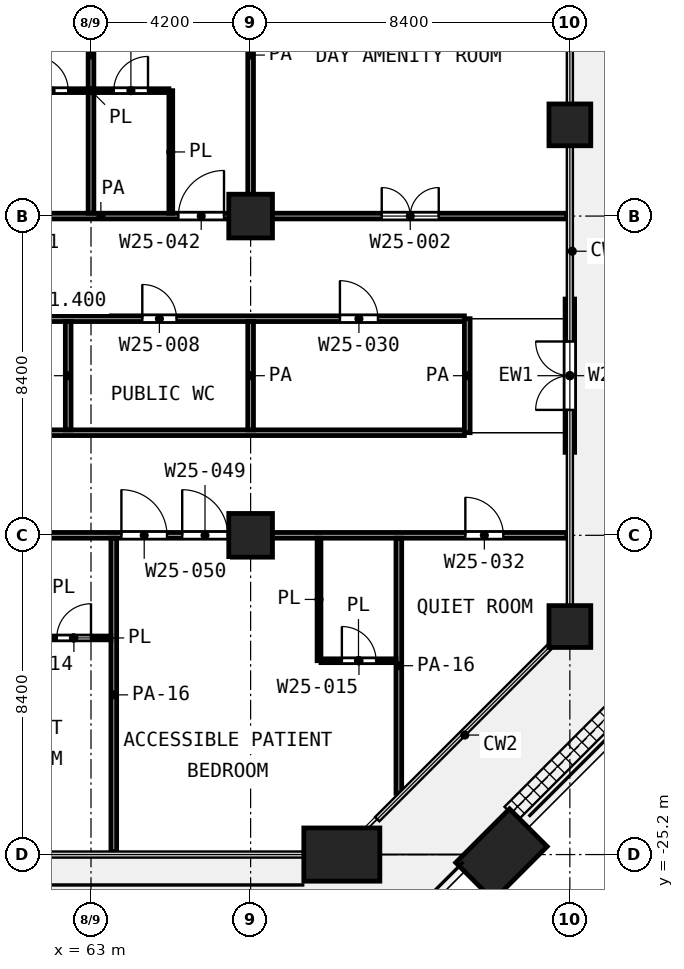
"""IFC4 building model, lengths in metres.
Left out: names, types, materials, properties, quantities, classifications, styles, units other than length and angle.
Written with IfcOpenShell. Run it as: python <this file> out.ifc"""

import sys

from ifc_helpers import new_model, si_unit, direction, frame, frame_2d, origin, origin_2d, place, context, subcontext, project, spatial, rectangle, extrude, element, fill, save


model = new_model("IFC4")
c1 = context("Model", 3, precision=1e-05, world=origin(), true_north=direction((0.0, 1.0)))
c2 = subcontext(c1, "Body", "Model", "MODEL_VIEW")
j1 = project(units=[si_unit("LENGTHUNIT", "METRE"), si_unit("PLANEANGLEUNIT", "RADIAN")], contexts=[c1])
p1 = place(None, origin())
s1 = spatial("IfcSite", under=j1, at=p1, CompositionType="ELEMENT")
p2 = place(p1, origin())
s2 = spatial("IfcBuilding", under=s1, at=p2, CompositionType="ELEMENT")
p3 = place(p2, frame((0.0, 0.0, 111.4)))
s3 = spatial("IfcBuildingStorey", under=s2, at=p3, CompositionType="ELEMENT", Elevation=111.4)
p4 = place(p3, frame((75.6, -6.0, 0.0), z_axis=(0.0, 0.0, 1.0), x_axis=(1.0, 0.0, 0.0)))
e1 = element("IfcColumn", 1, at=p4, inside=s3, PredefinedType="COLUMN", context=c2, shape_type="SweptSolid", body=[
    extrude(rectangle(XDim=1.1, YDim=1.1, at=origin_2d()), origin(), (0.0, 0.0, 1.0), 4.2),
])
for number, where, z_axis, x_axis in (
    (2, (67.2, -8.4, 0.0), (0.0, 0.0, 1.0), (1.0, 0.0, 0.0)),
    (3, (67.2, -16.8, 0.0), (0.0, 0.0, 1.0), (1.0, 0.0, 0.0)),
):
    element("IfcColumn", number, at=place(p3, frame(where, z_axis=z_axis, x_axis=x_axis)), inside=s3, PredefinedType="COLUMN", context=c2, shape_type="SweptSolid", body=[
        extrude(rectangle(XDim=1.15, YDim=1.15, at=origin_2d()), origin(), (0.0, 0.0, 1.0), 4.2),
    ])
p5 = place(p3, frame((75.6, -19.2, 0.0), z_axis=(0.0, 0.0, 1.0), x_axis=(1.0, 0.0, 0.0)))
e4 = element("IfcColumn", 4, at=p5, inside=s3, PredefinedType="COLUMN", context=c2, shape_type="SweptSolid", body=[
    extrude(rectangle(XDim=1.1, YDim=1.1, at=origin_2d()), origin(), (0.0, 0.0, 1.0), 4.2),
])
for number, where, z_axis, x_axis in (
    (5, (69.6, -25.2, 0.0), (0.0, 0.0, 1.0), (-1.0, 0.0, 0.0)),
    (6, (73.8, -25.2, 0.0), (0.0, 0.0, 1.0), (-0.707, -0.707, 0.0)),
):
    element("IfcColumn", number, at=place(p3, frame(where, z_axis=z_axis, x_axis=x_axis)), inside=s3, PredefinedType="COLUMN", context=c2, shape_type="SweptSolid", body=[
        extrude(rectangle(XDim=2.0, YDim=1.4, at=origin_2d()), origin(), (0.0, 0.0, 1.0), 4.2),
    ])
p6 = place(p3, frame((75.6, -14.617, 0.0), z_axis=(0.0, 0.0, 1.0), x_axis=(0.0, 1.0, 0.0)))
e7 = element("IfcWall", 7, at=p6, inside=s3, PredefinedType="SOLIDWALL", context=c2, shape_type="SweptSolid", body=[
    extrude(rectangle(XDim=4.033, YDim=0.25, at=frame_2d((2.017, 0.0))), origin(), (0.0, 0.0, 1.0), 3.48),
])
p7 = place(p6, frame((1.117, 0.0, 0.0)))
e8 = element("IfcOpeningElement", 8, at=p7, cuts=e7, PredefinedType="OPENING", context=c2, shape_type="SweptSolid", body=[
    extrude(rectangle(XDim=1.8, YDim=2.1, at=frame_2d((0.9, 1.05))), frame((0.0, 0.135, 0.0), z_axis=(0.0, -1.0, 0.0), x_axis=(1.0, 0.0, 0.0)), (0.0, 0.0, 1.0), 0.27),
])
p8 = place(p3, frame((69.052, -20.1, 0.0), z_axis=(0.0, 0.0, 1.0), x_axis=(1.0, 0.0, 0.0)))
e9 = element("IfcWall", 9, at=p8, inside=s3, PredefinedType="PARTITIONING", context=c2, shape_type="SweptSolid", body=[
    extrude(rectangle(XDim=1.973, YDim=0.1, at=frame_2d((0.986, 0.0))), origin(), (0.0, 0.0, 1.0), 3.6),
])
p9 = place(p8, frame((0.549, 0.0, 0.0)))
e10 = element("IfcOpeningElement", 10, at=p9, cuts=e9, PredefinedType="OPENING", context=c2, shape_type="SweptSolid", body=[
    extrude(rectangle(XDim=0.9, YDim=2.1, at=frame_2d((0.45, 1.05))), frame((0.0, 0.06, 0.0), z_axis=(0.0, -1.0, 0.0), x_axis=(1.0, 0.0, 0.0)), (0.0, 0.0, 1.0), 0.12),
])
p10 = place(p3, frame((61.55, -19.5, 0.0), z_axis=(0.0, 0.0, 1.0), x_axis=(1.0, 0.0, 0.0)))
e11 = element("IfcWall", 11, at=p10, inside=s3, PredefinedType="PARTITIONING", context=c2, shape_type="SweptSolid", body=[
    extrude(rectangle(XDim=1.975, YDim=0.1, at=frame_2d((0.987, 0.0))), origin(), (0.0, 0.0, 1.0), 3.6),
])
p11 = place(p10, frame((0.55, 0.0, 0.0)))
e12 = element("IfcOpeningElement", 12, at=p11, cuts=e11, PredefinedType="OPENING", context=c2, shape_type="SweptSolid", body=[
    extrude(rectangle(XDim=0.9, YDim=2.1, at=frame_2d((0.45, 1.05))), frame((0.0, 0.06, 0.0), z_axis=(0.0, -1.0, 0.0), x_axis=(1.0, 0.0, 0.0)), (0.0, 0.0, 1.0), 0.12),
])
p12 = place(p3, frame((60.95, -5.1, 0.0), z_axis=(0.0, 0.0, 1.0), x_axis=(1.0, 0.0, 0.0)))
e13 = element("IfcWall", 13, at=p12, inside=s3, PredefinedType="PARTITIONING", context=c2, shape_type="SweptSolid", body=[
    extrude(rectangle(XDim=4.1, YDim=0.1, at=frame_2d((2.05, 0.0))), origin(), (0.0, 0.0, 1.0), 3.6),
])
p13 = place(p12, frame((0.55, 0.0, 0.0)))
e14 = element("IfcOpeningElement", 14, at=p13, cuts=e13, PredefinedType="OPENING", context=c2, shape_type="SweptSolid", body=[
    extrude(rectangle(XDim=0.9, YDim=2.1, at=frame_2d((0.45, 1.05))), frame((0.0, 0.06, 0.0), z_axis=(0.0, -1.0, 0.0), x_axis=(1.0, 0.0, 0.0)), (0.0, 0.0, 1.0), 0.12),
])
p14 = place(p12, frame((2.65, 0.0, 0.0)))
e15 = element("IfcOpeningElement", 15, at=p14, cuts=e13, PredefinedType="OPENING", context=c2, shape_type="SweptSolid", body=[
    extrude(rectangle(XDim=0.9, YDim=2.1, at=frame_2d((0.45, 1.05))), frame((0.0, 0.06, 0.0), z_axis=(0.0, -1.0, 0.0), x_axis=(1.0, 0.0, 0.0)), (0.0, 0.0, 1.0), 0.12),
])
p15 = place(p3, frame((65.1, -8.325, 0.0), z_axis=(0.0, 0.0, 1.0), x_axis=(0.0, 1.0, 0.0)))
e16 = element("IfcWall", 16, at=p15, inside=s3, PredefinedType="PARTITIONING", context=c2, shape_type="SweptSolid", body=[
    extrude(rectangle(XDim=3.225, YDim=0.1, at=frame_2d((1.612, 0.0))), origin(), (0.0, 0.0, 1.0), 3.6),
])
p16 = place(p3, frame((69.0, -20.099, 0.0), z_axis=(0.0, 0.0, 1.0), x_axis=(0.0, 1.0, 0.0)))
e17 = element("IfcWall", 17, at=p16, inside=s3, PredefinedType="PARTITIONING", context=c2, shape_type="SweptSolid", body=[
    extrude(rectangle(XDim=3.224, YDim=0.1, at=frame_2d((1.612, 0.0))), origin(), (0.0, 0.0, 1.0), 3.6),
])
p17 = place(p3, frame((25.0, -16.8, 0.0), z_axis=(0.0, 0.0, 1.0), x_axis=(1.0, 0.0, 0.0)))
e18 = element("IfcWall", 18, at=p17, inside=s3, PredefinedType="PARTITIONING", context=c2, shape_type="SweptSolid", body=[
    extrude(rectangle(XDim=50.52, YDim=0.15, at=frame_2d((25.26, 0.0))), origin(), (0.0, 0.0, 1.0), 3.6),
])
p18 = place(p17, frame((1.55, 0.0, 0.0)))
e19 = element("IfcOpeningElement", 19, at=p18, cuts=e18, PredefinedType="OPENING", context=c2, shape_type="SweptSolid", body=[
    extrude(rectangle(XDim=1.5, YDim=2.1, at=frame_2d((0.75, 1.05))), frame((0.0, 0.085, 0.0), z_axis=(0.0, -1.0, 0.0), x_axis=(1.0, 0.0, 0.0)), (0.0, 0.0, 1.0), 0.17),
])
p19 = place(p17, frame((6.0, 0.0, 0.0)))
e20 = element("IfcOpeningElement", 20, at=p19, cuts=e18, PredefinedType="OPENING", context=c2, shape_type="SweptSolid", body=[
    extrude(rectangle(XDim=1.0, YDim=2.1, at=frame_2d((0.5, 1.05))), frame((0.0, 0.085, 0.0), z_axis=(0.0, -1.0, 0.0), x_axis=(1.0, 0.0, 0.0)), (0.0, 0.0, 1.0), 0.17),
])
p20 = place(p17, frame((9.6, 0.0, 0.0)))
e21 = element("IfcOpeningElement", 21, at=p20, cuts=e18, PredefinedType="OPENING", context=c2, shape_type="SweptSolid", body=[
    extrude(rectangle(XDim=1.2, YDim=2.1, at=frame_2d((0.6, 1.05))), frame((0.0, 0.085, 0.0), z_axis=(0.0, -1.0, 0.0), x_axis=(1.0, 0.0, 0.0)), (0.0, 0.0, 1.0), 0.17),
])
p21 = place(p17, frame((18.2, 0.0, 0.0)))
e22 = element("IfcOpeningElement", 22, at=p21, cuts=e18, PredefinedType="OPENING", context=c2, shape_type="SweptSolid", body=[
    extrude(rectangle(XDim=1.2, YDim=2.1, at=frame_2d((0.6, 1.05))), frame((0.0, 0.085, 0.0), z_axis=(0.0, -1.0, 0.0), x_axis=(1.0, 0.0, 0.0)), (0.0, 0.0, 1.0), 0.17),
])
p22 = place(p17, frame((15.45, 0.0, 0.0)))
e23 = element("IfcOpeningElement", 23, at=p22, cuts=e18, PredefinedType="OPENING", context=c2, shape_type="SweptSolid", body=[
    extrude(rectangle(XDim=0.9, YDim=2.1, at=frame_2d((0.45, 1.05))), frame((0.0, 0.085, 0.0), z_axis=(0.0, -1.0, 0.0), x_axis=(1.0, 0.0, 0.0)), (0.0, 0.0, 1.0), 0.17),
])
p23 = place(p17, frame((23.6, 0.0, 0.0)))
e24 = element("IfcOpeningElement", 24, at=p23, cuts=e18, PredefinedType="OPENING", context=c2, shape_type="SweptSolid", body=[
    extrude(rectangle(XDim=1.2, YDim=2.1, at=frame_2d((0.6, 1.05))), frame((0.0, 0.085, 0.0), z_axis=(0.0, -1.0, 0.0), x_axis=(1.0, 0.0, 0.0)), (0.0, 0.0, 1.0), 0.17),
])
p24 = place(p17, frame((26.1, 0.0, 0.0)))
e25 = element("IfcOpeningElement", 25, at=p24, cuts=e18, PredefinedType="OPENING", context=c2, shape_type="SweptSolid", body=[
    extrude(rectangle(XDim=1.2, YDim=2.1, at=frame_2d((0.6, 1.05))), frame((0.0, 0.085, 0.0), z_axis=(0.0, -1.0, 0.0), x_axis=(1.0, 0.0, 0.0)), (0.0, 0.0, 1.0), 0.17),
])
p25 = place(p17, frame((32.0, 0.0, 0.0)))
e26 = element("IfcOpeningElement", 26, at=p25, cuts=e18, PredefinedType="OPENING", context=c2, shape_type="SweptSolid", body=[
    extrude(rectangle(XDim=1.2, YDim=2.1, at=frame_2d((0.6, 1.05))), frame((0.0, 0.085, 0.0), z_axis=(0.0, -1.0, 0.0), x_axis=(1.0, 0.0, 0.0)), (0.0, 0.0, 1.0), 0.17),
])
p26 = place(p17, frame((35.0, 0.0, 0.0)))
e27 = element("IfcOpeningElement", 27, at=p26, cuts=e18, PredefinedType="OPENING", context=c2, shape_type="SweptSolid", body=[
    extrude(rectangle(XDim=1.2, YDim=2.1, at=frame_2d((0.6, 1.05))), frame((0.0, 0.085, 0.0), z_axis=(0.0, -1.0, 0.0), x_axis=(1.0, 0.0, 0.0)), (0.0, 0.0, 1.0), 0.17),
])
p27 = place(p17, frame((40.4, 0.0, 0.0)))
e28 = element("IfcOpeningElement", 28, at=p27, cuts=e18, PredefinedType="OPENING", context=c2, shape_type="SweptSolid", body=[
    extrude(rectangle(XDim=1.2, YDim=2.1, at=frame_2d((0.6, 1.05))), frame((0.0, 0.085, 0.0), z_axis=(0.0, -1.0, 0.0), x_axis=(1.0, 0.0, 0.0)), (0.0, 0.0, 1.0), 0.17),
])
p28 = place(p17, frame((38.8, 0.0, 0.0)))
e29 = element("IfcOpeningElement", 29, at=p28, cuts=e18, PredefinedType="OPENING", context=c2, shape_type="SweptSolid", body=[
    extrude(rectangle(XDim=1.2, YDim=2.1, at=frame_2d((0.6, 1.05))), frame((0.0, 0.085, 0.0), z_axis=(0.0, -1.0, 0.0), x_axis=(1.0, 0.0, 0.0)), (0.0, 0.0, 1.0), 0.17),
])
p29 = place(p17, frame((47.85, 0.0, 0.0)))
e30 = element("IfcOpeningElement", 30, at=p29, cuts=e18, PredefinedType="OPENING", context=c2, shape_type="SweptSolid", body=[
    extrude(rectangle(XDim=1.0, YDim=2.1, at=frame_2d((0.5, 1.05))), frame((0.0, 0.085, 0.0), z_axis=(0.0, -1.0, 0.0), x_axis=(1.0, 0.0, 0.0)), (0.0, 0.0, 1.0), 0.17),
])
p30 = place(p3, frame((29.475, -14.1, 0.0), z_axis=(0.0, 0.0, 1.0), x_axis=(1.0, 0.0, 0.0)))
e31 = element("IfcWall", 31, at=p30, inside=s3, PredefinedType="PARTITIONING", context=c2, shape_type="SweptSolid", body=[
    extrude(rectangle(XDim=43.35, YDim=0.15, at=frame_2d((21.675, 0.0))), origin(), (0.0, 0.0, 1.0), 3.6),
])
p31 = place(p30, frame((20.425, 0.0, 0.0)))
e32 = element("IfcOpeningElement", 32, at=p31, cuts=e31, PredefinedType="OPENING", context=c2, shape_type="SweptSolid", body=[
    extrude(rectangle(XDim=1.0, YDim=2.1, at=frame_2d((0.5, 1.05))), frame((0.0, 0.085, 0.0), z_axis=(0.0, -1.0, 0.0), x_axis=(1.0, 0.0, 0.0)), (0.0, 0.0, 1.0), 0.17),
])
p32 = place(p3, frame((29.475, -11.1, 0.0), z_axis=(0.0, 0.0, 1.0), x_axis=(1.0, 0.0, 0.0)))
e33 = element("IfcWall", 33, at=p32, inside=s3, PredefinedType="PARTITIONING", context=c2, shape_type="SweptSolid", body=[
    extrude(rectangle(XDim=43.35, YDim=0.15, at=frame_2d((21.675, 0.0))), origin(), (0.0, 0.0, 1.0), 3.6),
])
p33 = place(p32, frame((28.675, 0.0, 0.0)))
e34 = element("IfcOpeningElement", 34, at=p33, cuts=e33, PredefinedType="OPENING", context=c2, shape_type="SweptSolid", body=[
    extrude(rectangle(XDim=1.0, YDim=2.1, at=frame_2d((0.5, 1.05))), frame((0.0, 0.085, 0.0), z_axis=(0.0, -1.0, 0.0), x_axis=(1.0, 0.0, 0.0)), (0.0, 0.0, 1.0), 0.17),
])
p34 = place(p32, frame((34.875, 0.0, 0.0)))
e35 = element("IfcOpeningElement", 35, at=p34, cuts=e33, PredefinedType="OPENING", context=c2, shape_type="SweptSolid", body=[
    extrude(rectangle(XDim=0.9, YDim=2.1, at=frame_2d((0.45, 1.05))), frame((0.0, 0.085, 0.0), z_axis=(0.0, -1.0, 0.0), x_axis=(1.0, 0.0, 0.0)), (0.0, 0.0, 1.0), 0.17),
])
p35 = place(p32, frame((40.075, 0.0, 0.0)))
e36 = element("IfcOpeningElement", 36, at=p35, cuts=e33, PredefinedType="OPENING", context=c2, shape_type="SweptSolid", body=[
    extrude(rectangle(XDim=1.0, YDim=2.1, at=frame_2d((0.5, 1.05))), frame((0.0, 0.085, 0.0), z_axis=(0.0, -1.0, 0.0), x_axis=(1.0, 0.0, 0.0)), (0.0, 0.0, 1.0), 0.17),
])
p36 = place(p32, frame((5.475, 0.0, 0.0)))
e37 = element("IfcOpeningElement", 37, at=p36, cuts=e33, PredefinedType="OPENING", context=c2, shape_type="SweptSolid", body=[
    extrude(rectangle(XDim=1.0, YDim=2.1, at=frame_2d((0.5, 1.05))), frame((0.0, 0.085, 0.0), z_axis=(0.0, -1.0, 0.0), x_axis=(1.0, 0.0, 0.0)), (0.0, 0.0, 1.0), 0.17),
])
p37 = place(p32, frame((12.675, 0.0, 0.0)))
e38 = element("IfcOpeningElement", 38, at=p37, cuts=e33, PredefinedType="OPENING", context=c2, shape_type="SweptSolid", body=[
    extrude(rectangle(XDim=1.0, YDim=2.1, at=frame_2d((0.5, 1.05))), frame((0.0, 0.085, 0.0), z_axis=(0.0, -1.0, 0.0), x_axis=(1.0, 0.0, 0.0)), (0.0, 0.0, 1.0), 0.17),
])
p38 = place(p3, frame((51.0, -8.4, 0.0), z_axis=(0.0, 0.0, 1.0), x_axis=(1.0, 0.0, 0.0)))
e39 = element("IfcWall", 39, at=p38, inside=s3, PredefinedType="PARTITIONING", context=c2, shape_type="SweptSolid", body=[
    extrude(rectangle(XDim=24.52, YDim=0.15, at=frame_2d((12.26, 0.0))), origin(), (0.0, 0.0, 1.0), 3.6),
])
p39 = place(p38, frame((5.4, 0.0, 0.0)))
e40 = element("IfcOpeningElement", 40, at=p39, cuts=e39, PredefinedType="OPENING", context=c2, shape_type="SweptSolid", body=[
    extrude(rectangle(XDim=1.2, YDim=2.1, at=frame_2d((0.6, 1.05))), frame((0.0, 0.085, 0.0), z_axis=(0.0, -1.0, 0.0), x_axis=(1.0, 0.0, 0.0)), (0.0, 0.0, 1.0), 0.17),
])
p40 = place(p38, frame((8.4, 0.0, 0.0)))
e41 = element("IfcOpeningElement", 41, at=p40, cuts=e39, PredefinedType="OPENING", context=c2, shape_type="SweptSolid", body=[
    extrude(rectangle(XDim=1.2, YDim=2.1, at=frame_2d((0.6, 1.05))), frame((0.0, 0.085, 0.0), z_axis=(0.0, -1.0, 0.0), x_axis=(1.0, 0.0, 0.0)), (0.0, 0.0, 1.0), 0.17),
])
p41 = place(p38, frame((14.3, 0.0, 0.0)))
e42 = element("IfcOpeningElement", 42, at=p41, cuts=e39, PredefinedType="OPENING", context=c2, shape_type="SweptSolid", body=[
    extrude(rectangle(XDim=1.2, YDim=2.1, at=frame_2d((0.6, 1.05))), frame((0.0, 0.085, 0.0), z_axis=(0.0, -1.0, 0.0), x_axis=(1.0, 0.0, 0.0)), (0.0, 0.0, 1.0), 0.17),
])
p42 = place(p38, frame((19.65, 0.0, 0.0)))
e43 = element("IfcOpeningElement", 43, at=p42, cuts=e39, PredefinedType="OPENING", context=c2, shape_type="SweptSolid", body=[
    extrude(rectangle(XDim=1.5, YDim=2.1, at=frame_2d((0.75, 1.05))), frame((0.0, 0.085, 0.0), z_axis=(0.0, -1.0, 0.0), x_axis=(1.0, 0.0, 0.0)), (0.0, 0.0, 1.0), 0.17),
])
p43 = place(p3, frame((62.4, -14.025, 0.0), z_axis=(0.0, 0.0, 1.0), x_axis=(0.0, 1.0, 0.0)))
e44 = element("IfcWall", 44, at=p43, inside=s3, PredefinedType="PARTITIONING", context=c2, shape_type="SweptSolid", body=[
    extrude(rectangle(XDim=2.85, YDim=0.15, at=frame_2d((1.425, 0.0))), origin(), (0.0, 0.0, 1.0), 3.6),
])
p44 = place(p3, frame((63.0, -8.325, 0.0), z_axis=(0.0, 0.0, 1.0), x_axis=(0.0, 1.0, 0.0)))
e45 = element("IfcWall", 45, at=p44, inside=s3, PredefinedType="PARTITIONING", context=c2, shape_type="SweptSolid", body=[
    extrude(rectangle(XDim=8.325, YDim=0.15, at=frame_2d((4.163, 0.0))), origin(), (0.0, 0.0, 1.0), 3.6),
])
p45 = place(p3, frame((63.6, -25.12, 0.0), z_axis=(0.0, 0.0, 1.0), x_axis=(0.0, 1.0, 0.0)))
e46 = element("IfcWall", 46, at=p45, inside=s3, PredefinedType="PARTITIONING", context=c2, shape_type="SweptSolid", body=[
    extrude(rectangle(XDim=8.245, YDim=0.15, at=frame_2d((4.123, 0.0))), origin(), (0.0, 0.0, 1.0), 2.7),
])
p46 = place(p3, frame((67.2, -14.025, 0.0), z_axis=(0.0, 0.0, 1.0), x_axis=(0.0, 1.0, 0.0)))
e47 = element("IfcWall", 47, at=p46, inside=s3, PredefinedType="PARTITIONING", context=c2, shape_type="SweptSolid", body=[
    extrude(rectangle(XDim=2.85, YDim=0.15, at=frame_2d((1.425, 0.0))), origin(), (0.0, 0.0, 1.0), 3.6),
])
p47 = place(p3, frame((67.2, -8.325, 0.0), z_axis=(0.0, 0.0, 1.0), x_axis=(0.0, 1.0, 0.0)))
e48 = element("IfcWall", 48, at=p47, inside=s3, PredefinedType="PARTITIONING", context=c2, shape_type="SweptSolid", body=[
    extrude(rectangle(XDim=8.323, YDim=0.15, at=frame_2d((4.162, 0.0))), origin(), (0.0, 0.0, 1.0), 3.6),
])
p48 = place(p3, frame((71.1, -23.587, 0.0), z_axis=(0.0, 0.0, 1.0), x_axis=(0.0, 1.0, 0.0)))
e49 = element("IfcWall", 49, at=p48, inside=s3, PredefinedType="PARTITIONING", context=c2, shape_type="SweptSolid", body=[
    extrude(rectangle(XDim=6.712, YDim=0.15, at=frame_2d((3.356, 0.0))), origin(), (0.0, 0.0, 1.0), 2.7),
])
p49 = place(p3, frame((72.9, -14.1, 0.0), z_axis=(0.0, 0.0, 1.0), x_axis=(0.0, 1.0, 0.0)))
e50 = element("IfcWall", 50, at=p49, inside=s3, PredefinedType="PARTITIONING", context=c2, shape_type="SweptSolid", body=[
    extrude(rectangle(XDim=3.0, YDim=0.15, at=frame_2d((1.5, 0.0))), origin(), (0.0, 0.0, 1.0), 3.6),
])
p50 = place(p7, origin())
e51 = element("IfcDoor", 51, at=p50, inside=s3, OperationType="DOUBLE_DOOR_SINGLE_SWING", PredefinedType="DOOR", context=c2, shape_type="SweptSolid", body=[
    extrude(rectangle(XDim=1.8, YDim=2.1, at=frame_2d((0.9, 1.05))), frame((0.0, 0.025, 0.0), z_axis=(0.0, -1.0, 0.0), x_axis=(1.0, 0.0, 0.0)), (0.0, 0.0, 1.0), 0.05),
])
fill(e8, e51)
p51 = place(p13, origin())
e52 = element("IfcDoor", 52, at=p51, inside=s3, OperationType="SINGLE_SWING_LEFT", PredefinedType="DOOR", context=c2, shape_type="SweptSolid", body=[
    extrude(rectangle(XDim=0.9, YDim=2.1, at=frame_2d((0.45, 1.05))), frame((0.0, 0.025, 0.0), z_axis=(0.0, -1.0, 0.0), x_axis=(1.0, 0.0, 0.0)), (0.0, 0.0, 1.0), 0.05),
])
fill(e14, e52)
p52 = place(p41, origin())
e53 = element("IfcDoor", 53, at=p52, inside=s3, OperationType="SINGLE_SWING_RIGHT", PredefinedType="DOOR", context=c2, shape_type="SweptSolid", body=[
    extrude(rectangle(XDim=1.2, YDim=2.1, at=frame_2d((0.6, 1.05))), frame((0.0, 0.025, 0.0), z_axis=(0.0, -1.0, 0.0), x_axis=(1.0, 0.0, 0.0)), (0.0, 0.0, 1.0), 0.05),
])
fill(e42, e53)
p53 = place(p14, origin())
e54 = element("IfcDoor", 54, at=p53, inside=s3, OperationType="SINGLE_SWING_RIGHT", PredefinedType="DOOR", context=c2, shape_type="SweptSolid", body=[
    extrude(rectangle(XDim=0.9, YDim=2.1, at=frame_2d((0.45, 1.05))), frame((0.0, 0.025, 0.0), z_axis=(0.0, -1.0, 0.0), x_axis=(1.0, 0.0, 0.0)), (0.0, 0.0, 1.0), 0.05),
])
fill(e15, e54)
p54 = place(p42, origin())
e55 = element("IfcDoor", 55, at=p54, inside=s3, OperationType="DOUBLE_DOOR_SINGLE_SWING", PredefinedType="DOOR", context=c2, shape_type="SweptSolid", body=[
    extrude(rectangle(XDim=1.5, YDim=2.1, at=frame_2d((0.75, 1.05))), frame((0.0, 0.025, 0.0), z_axis=(0.0, -1.0, 0.0), x_axis=(1.0, 0.0, 0.0)), (0.0, 0.0, 1.0), 0.05),
])
fill(e43, e55)
p55 = place(p34, origin())
e56 = element("IfcDoor", 56, at=p55, inside=s3, OperationType="SINGLE_SWING_LEFT", PredefinedType="DOOR", context=c2, shape_type="SweptSolid", body=[
    extrude(rectangle(XDim=0.9, YDim=2.1, at=frame_2d((0.45, 1.05))), frame((0.0, 0.025, 0.0), z_axis=(0.0, -1.0, 0.0), x_axis=(1.0, 0.0, 0.0)), (0.0, 0.0, 1.0), 0.05),
])
fill(e35, e56)
p56 = place(p35, origin())
e57 = element("IfcDoor", 57, at=p56, inside=s3, OperationType="SINGLE_SWING_LEFT", PredefinedType="DOOR", context=c2, shape_type="SweptSolid", body=[
    extrude(rectangle(XDim=1.0, YDim=2.1, at=frame_2d((0.5, 1.05))), frame((0.0, 0.025, 0.0), z_axis=(0.0, -1.0, 0.0), x_axis=(1.0, 0.0, 0.0)), (0.0, 0.0, 1.0), 0.05),
])
fill(e36, e57)
p57 = place(p11, origin())
e58 = element("IfcDoor", 58, at=p57, inside=s3, OperationType="SINGLE_SWING_RIGHT", PredefinedType="DOOR", context=c2, shape_type="SweptSolid", body=[
    extrude(rectangle(XDim=0.9, YDim=2.1, at=frame_2d((0.45, 1.05))), frame((0.0, 0.025, 0.0), z_axis=(0.0, -1.0, 0.0), x_axis=(1.0, 0.0, 0.0)), (0.0, 0.0, 1.0), 0.05),
])
fill(e12, e58)
p58 = place(p27, origin())
e59 = element("IfcDoor", 59, at=p58, inside=s3, OperationType="SINGLE_SWING_LEFT", PredefinedType="DOOR", context=c2, shape_type="SweptSolid", body=[
    extrude(rectangle(XDim=1.2, YDim=2.1, at=frame_2d((0.6, 1.05))), frame((0.0, 0.025, 0.0), z_axis=(0.0, -1.0, 0.0), x_axis=(1.0, 0.0, 0.0)), (0.0, 0.0, 1.0), 0.05),
])
fill(e28, e59)
p59 = place(p28, origin())
e60 = element("IfcDoor", 60, at=p59, inside=s3, OperationType="SINGLE_SWING_LEFT", PredefinedType="DOOR", context=c2, shape_type="SweptSolid", body=[
    extrude(rectangle(XDim=1.2, YDim=2.1, at=frame_2d((0.6, 1.05))), frame((0.0, 0.025, 0.0), z_axis=(0.0, -1.0, 0.0), x_axis=(1.0, 0.0, 0.0)), (0.0, 0.0, 1.0), 0.05),
])
fill(e29, e60)
p60 = place(p9, origin())
e61 = element("IfcDoor", 61, at=p60, inside=s3, OperationType="SINGLE_SWING_LEFT", PredefinedType="DOOR", context=c2, shape_type="SweptSolid", body=[
    extrude(rectangle(XDim=0.9, YDim=2.1, at=frame_2d((0.45, 1.05))), frame((0.0, 0.025, 0.0), z_axis=(0.0, -1.0, 0.0), x_axis=(1.0, 0.0, 0.0)), (0.0, 0.0, 1.0), 0.05),
])
fill(e10, e61)
p61 = place(p29, origin())
e62 = element("IfcDoor", 62, at=p61, inside=s3, OperationType="SINGLE_SWING_LEFT", PredefinedType="DOOR", context=c2, shape_type="SweptSolid", body=[
    extrude(rectangle(XDim=1.0, YDim=2.1, at=frame_2d((0.5, 1.05))), frame((0.0, 0.025, 0.0), z_axis=(0.0, -1.0, 0.0), x_axis=(1.0, 0.0, 0.0)), (0.0, 0.0, 1.0), 0.05),
])
fill(e30, e62)
save(model, sys.argv[1])
